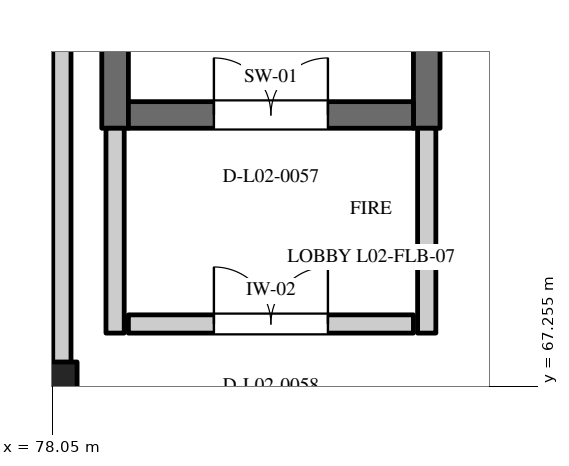
"""IFC4 building model, lengths in metres.
Left out: names, types, materials, properties, quantities, classifications, styles, units other than length and angle.
Written with IfcOpenShell. Run it as: python <this file> out.ifc"""

import sys

from ifc_helpers import new_model, si_unit, direction, frame, frame_2d, origin, origin_2d, place, context, subcontext, project, spatial, rectangle, extrude, element, fill, save


model = new_model("IFC4")
c1 = context("Model", 3, precision=1e-05, world=origin(), true_north=direction((0.0, 1.0)))
c2 = subcontext(c1, "Body", "Model", "MODEL_VIEW")
j1 = project(units=[si_unit("LENGTHUNIT", "METRE"), si_unit("PLANEANGLEUNIT", "RADIAN")], contexts=[c1])
p1 = place(None, origin())
s1 = spatial("IfcSite", under=j1, at=p1, CompositionType="ELEMENT")
p2 = place(p1, origin())
s2 = spatial("IfcBuilding", under=s1, at=p2, CompositionType="ELEMENT")
p3 = place(p2, frame((0.0, 0.0, 9.6)))
s3 = spatial("IfcBuildingStorey", under=s2, at=p3, CompositionType="ELEMENT", Elevation=9.6)
p4 = place(p3, frame((78.0, 67.2, 0.0), z_axis=(0.0, 0.0, 1.0), x_axis=(1.0, 0.0, 0.0)))
e1 = element("IfcColumn", 1, at=p4, inside=s3, PredefinedType="COLUMN", context=c2, shape_type="SweptSolid", body=[
    extrude(rectangle(XDim=0.75, YDim=0.75, at=origin_2d()), origin(), (0.0, 0.0, 1.0), 4.8),
])
for number, where, z_axis, x_axis in (
    (2, (78.875, 70.65, 0.0), (0.0, 0.0, 1.0), (0.0, 1.0, 0.0)),
    (3, (82.975, 70.65, 0.0), (0.0, 0.0, 1.0), (0.0, 1.0, 0.0)),
):
    element("IfcWall", number, at=place(p3, frame(where, z_axis=z_axis, x_axis=x_axis)), inside=s3, PredefinedType="SHEAR", context=c2, shape_type="SweptSolid", body=[
        extrude(rectangle(XDim=10.5, YDim=0.35, at=frame_2d((5.25, 0.0))), origin(), (0.0, 0.0, 1.0), 4.8),
    ])
p5 = place(p3, frame((79.05, 70.825, 0.0), z_axis=(0.0, 0.0, 1.0), x_axis=(1.0, 0.0, 0.0)))
e4 = element("IfcWall", 4, at=p5, inside=s3, PredefinedType="SHEAR", context=c2, shape_type="SweptSolid", body=[
    extrude(rectangle(XDim=3.75, YDim=0.35, at=frame_2d((1.875, 0.0))), origin(), (0.0, 0.0, 1.0), 4.5),
])
p6 = place(p5, frame((1.125, 0.0, 0.0)))
e5 = element("IfcOpeningElement", 5, at=p6, cuts=e4, PredefinedType="OPENING", context=c2, shape_type="SweptSolid", body=[
    extrude(rectangle(XDim=1.5, YDim=2.2, at=frame_2d((0.75, 1.1))), frame((0.0, 0.187, 0.0), z_axis=(0.0, -1.0, 0.0), x_axis=(1.0, 0.0, 0.0)), (0.0, 0.0, 1.0), 0.374),
])
for number, where, z_axis, x_axis in (
    (6, (78.875, 67.955, 0.0), (0.0, 0.0, 1.0), (0.0, 1.0, 0.0)),
    (7, (82.975, 67.955, 0.0), (0.0, 0.0, 1.0), (0.0, 1.0, 0.0)),
):
    element("IfcWall", number, at=place(p3, frame(where, z_axis=z_axis, x_axis=x_axis)), inside=s3, PredefinedType="STANDARD", context=c2, shape_type="SweptSolid", body=[
        extrude(rectangle(XDim=2.695, YDim=0.24, at=frame_2d((1.347, 0.0))), origin(), (0.0, 0.0, 1.0), 4.5),
    ])
p7 = place(p3, frame((79.05, 68.075, 0.0), z_axis=(0.0, 0.0, 1.0), x_axis=(1.0, 0.0, 0.0)))
e8 = element("IfcWall", 8, at=p7, inside=s3, PredefinedType="STANDARD", context=c2, shape_type="SweptSolid", body=[
    extrude(rectangle(XDim=3.75, YDim=0.24, at=frame_2d((1.875, 0.0))), origin(), (0.0, 0.0, 1.0), 4.5),
])
p8 = place(p7, frame((1.125, 0.0, 0.0)))
e9 = element("IfcOpeningElement", 9, at=p8, cuts=e8, PredefinedType="OPENING", context=c2, shape_type="SweptSolid", body=[
    extrude(rectangle(XDim=1.5, YDim=2.2, at=frame_2d((0.75, 1.1))), frame((0.0, 0.132, 0.0), z_axis=(0.0, -1.0, 0.0), x_axis=(1.0, 0.0, 0.0)), (0.0, 0.0, 1.0), 0.264),
])
p9 = place(p3, frame((70.51, 67.4, 0.0), z_axis=(0.0, 0.0, 1.0), x_axis=(1.0, 0.0, 0.0)))
e10 = element("IfcWall", 10, at=p9, inside=s3, PredefinedType="STANDARD", context=c2, shape_type="SweptSolid", body=[
    extrude(rectangle(XDim=7.555, YDim=0.24, at=frame_2d((3.777, 0.0))), origin(), (0.0, 0.0, 1.0), 4.48),
])
p10 = place(p9, frame((1.939, 0.0, 0.0)))
e11 = element("IfcOpeningElement", 11, at=p10, cuts=e10, PredefinedType="OPENING", context=c2, shape_type="SweptSolid", body=[
    extrude(rectangle(XDim=1.65, YDim=2.25, at=frame_2d((0.825, 1.125))), frame((0.0, 0.132, 0.0), z_axis=(0.0, -1.0, 0.0), x_axis=(1.0, 0.0, 0.0)), (0.0, 0.0, 1.0), 0.264),
])
p11 = place(p3, frame((78.175, 67.51, 0.0), z_axis=(0.0, 0.0, 1.0), x_axis=(0.0, 1.0, 0.0)))
e12 = element("IfcWall", 12, at=p11, inside=s3, PredefinedType="STANDARD", context=c2, shape_type="SweptSolid", body=[
    extrude(rectangle(XDim=24.78, YDim=0.24, at=frame_2d((12.39, 0.0))), origin(), (0.0, 0.0, 1.0), 3.75),
])
p12 = place(p6, origin())
e13 = element("IfcDoor", 13, at=p12, inside=s3, OperationType="DOUBLE_DOOR_SINGLE_SWING", PredefinedType="DOOR", context=c2, shape_type="SweptSolid", body=[
    extrude(rectangle(XDim=1.5, YDim=2.2, at=frame_2d((0.75, 1.1))), frame((0.0, 0.025, 0.0), z_axis=(0.0, -1.0, 0.0), x_axis=(1.0, 0.0, 0.0)), (0.0, 0.0, 1.0), 0.05),
])
fill(e5, e13)
p13 = place(p8, origin())
e14 = element("IfcDoor", 14, at=p13, inside=s3, OperationType="DOUBLE_DOOR_SINGLE_SWING", PredefinedType="DOOR", context=c2, shape_type="SweptSolid", body=[
    extrude(rectangle(XDim=1.5, YDim=2.2, at=frame_2d((0.75, 1.1))), frame((0.0, 0.025, 0.0), z_axis=(0.0, -1.0, 0.0), x_axis=(1.0, 0.0, 0.0)), (0.0, 0.0, 1.0), 0.05),
])
fill(e9, e14)
save(model, sys.argv[1])
